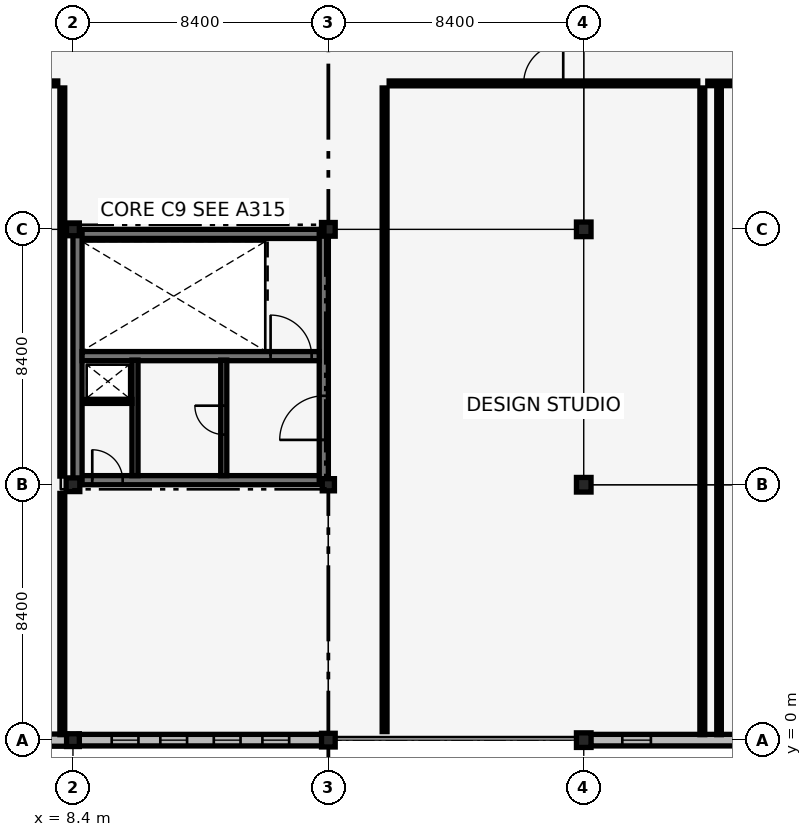
"""IFC4 building model, lengths in metres.
Left out: names, types, materials, properties, quantities, classifications, styles, units other than length and angle.
Written with IfcOpenShell. Run it as: python <this file> out.ifc"""

import sys

from ifc_helpers import new_model, si_unit, direction, frame, frame_2d, origin, origin_2d, place, context, subcontext, project, spatial, rectangle, extrude, element, fill, save


model = new_model("IFC4")
c1 = context("Model", 3, precision=1e-05, world=origin(), true_north=direction((0.0, 1.0)))
c2 = subcontext(c1, "Body", "Model", "MODEL_VIEW")
j1 = project(units=[si_unit("LENGTHUNIT", "METRE"), si_unit("PLANEANGLEUNIT", "RADIAN")], contexts=[c1])
p1 = place(None, origin())
s1 = spatial("IfcSite", under=j1, at=p1, CompositionType="ELEMENT")
p2 = place(p1, origin())
s2 = spatial("IfcBuilding", under=s1, at=p2, CompositionType="ELEMENT")
p3 = place(p2, frame((0.0, 0.0, 5.44)))
s3 = spatial("IfcBuildingStorey", under=s2, at=p3, CompositionType="ELEMENT", Elevation=5.44)
p4 = place(p3, frame((8.55, 8.55, 0.0), z_axis=(0.0, 0.0, 1.0), x_axis=(1.0, 0.0, 0.0)))
e1 = element("IfcWall", 1, at=p4, inside=s3, PredefinedType="SHEAR", context=c2, shape_type="SweptSolid", body=[
    extrude(rectangle(XDim=8.1, YDim=0.3, at=frame_2d((4.05, 0.0))), origin(), (0.0, 0.0, 1.0), 4.12),
])
p5 = place(p4, frame((0.485, 0.0, 0.0)))
e2 = element("IfcOpeningElement", 2, at=p5, cuts=e1, PredefinedType="OPENING", context=c2, shape_type="SweptSolid", body=[
    extrude(rectangle(XDim=1.0, YDim=2.15, at=frame_2d((0.5, 1.075))), frame((0.0, 0.16, 0.0), z_axis=(0.0, -1.0, 0.0), x_axis=(1.0, 0.0, 0.0)), (0.0, 0.0, 1.0), 0.32),
])
for number, where, z_axis, x_axis in (
    (3, (8.55, 16.65, 0.0), (0.0, 0.0, 1.0), (1.0, 0.0, 0.0)),
    (4, (8.55, 8.55, 0.0), (0.0, 0.0, 1.0), (0.0, 1.0, 0.0)),
):
    element("IfcWall", number, at=place(p3, frame(where, z_axis=z_axis, x_axis=x_axis)), inside=s3, PredefinedType="SHEAR", context=c2, shape_type="SweptSolid", body=[
        extrude(rectangle(XDim=8.1, YDim=0.3, at=frame_2d((4.05, 0.0))), origin(), (0.0, 0.0, 1.0), 4.12),
    ])
p6 = place(p3, frame((16.65, 8.55, 0.0), z_axis=(0.0, 0.0, 1.0), x_axis=(0.0, 1.0, 0.0)))
e5 = element("IfcWall", 5, at=p6, inside=s3, PredefinedType="SHEAR", context=c2, shape_type="SweptSolid", body=[
    extrude(rectangle(XDim=8.1, YDim=0.3, at=frame_2d((4.05, 0.0))), origin(), (0.0, 0.0, 1.0), 4.12),
])
p7 = place(p6, frame((1.325, 0.0, 0.0)))
e6 = element("IfcOpeningElement", 6, at=p7, cuts=e5, PredefinedType="OPENING", context=c2, shape_type="SweptSolid", body=[
    extrude(rectangle(XDim=1.45, YDim=2.15, at=frame_2d((0.725, 1.075))), frame((0.0, 0.16, 0.0), z_axis=(0.0, -1.0, 0.0), x_axis=(1.0, 0.0, 0.0)), (0.0, 0.0, 1.0), 0.32),
])
p8 = place(p3, frame((8.7, 12.63, 0.0), z_axis=(0.0, 0.0, 1.0), x_axis=(1.0, 0.0, 0.0)))
e7 = element("IfcWall", 7, at=p8, inside=s3, PredefinedType="SHEAR", context=c2, shape_type="SweptSolid", body=[
    extrude(rectangle(XDim=7.8, YDim=0.3, at=frame_2d((3.9, 0.0))), origin(), (0.0, 0.0, 1.0), 4.12),
])
p9 = place(p8, frame((6.2, 0.0, 0.0)))
e8 = element("IfcOpeningElement", 8, at=p9, cuts=e7, PredefinedType="OPENING", context=c2, shape_type="SweptSolid", body=[
    extrude(rectangle(XDim=1.35, YDim=2.15, at=frame_2d((0.675, 1.075))), frame((0.0, 0.16, 0.0), z_axis=(0.0, -1.0, 0.0), x_axis=(1.0, 0.0, 0.0)), (0.0, 0.0, 1.0), 0.32),
])
p10 = place(p3, frame((8.4, 0.0, 0.0), z_axis=(0.0, 0.0, 1.0), x_axis=(1.0, 0.0, 0.0)))
e9 = element("IfcColumn", 9, at=p10, inside=s3, PredefinedType="COLUMN", context=c2, shape_type="SweptSolid", body=[
    extrude(rectangle(XDim=0.42, YDim=0.42, at=origin_2d()), origin(), (0.0, 0.0, 1.0), 4.12),
])
p11 = place(p3, frame((8.4, 8.4, 0.0), z_axis=(0.0, 0.0, 1.0), x_axis=(1.0, 0.0, 0.0)))
e10 = element("IfcColumn", 10, at=p11, inside=s3, PredefinedType="COLUMN", context=c2, shape_type="SweptSolid", body=[
    extrude(rectangle(XDim=0.45, YDim=0.45, at=origin_2d()), origin(), (0.0, 0.0, 1.0), 4.12),
])
p12 = place(p3, frame((8.4, 16.8, 0.0), z_axis=(0.0, 0.0, 1.0), x_axis=(1.0, 0.0, 0.0)))
e11 = element("IfcColumn", 11, at=p12, inside=s3, PredefinedType="COLUMN", context=c2, shape_type="SweptSolid", body=[
    extrude(rectangle(XDim=0.42, YDim=0.42, at=origin_2d()), origin(), (0.0, 0.0, 1.0), 4.12),
])
p13 = place(p3, frame((16.8, 0.0, 0.0), z_axis=(0.0, 0.0, 1.0), x_axis=(1.0, 0.0, 0.0)))
e12 = element("IfcColumn", 12, at=p13, inside=s3, PredefinedType="COLUMN", context=c2, shape_type="SweptSolid", body=[
    extrude(rectangle(XDim=0.45, YDim=0.45, at=origin_2d()), origin(), (0.0, 0.0, 1.0), 4.12),
])
p14 = place(p3, frame((16.8, 8.4, 0.0), z_axis=(0.0, 0.0, 1.0), x_axis=(1.0, 0.0, 0.0)))
e13 = element("IfcColumn", 13, at=p14, inside=s3, PredefinedType="COLUMN", context=c2, shape_type="SweptSolid", body=[
    extrude(rectangle(XDim=0.4, YDim=0.4, at=origin_2d()), origin(), (0.0, 0.0, 1.0), 4.12),
])
p15 = place(p3, frame((16.8, 16.8, 0.0), z_axis=(0.0, 0.0, 1.0), x_axis=(1.0, 0.0, 0.0)))
e14 = element("IfcColumn", 14, at=p15, inside=s3, PredefinedType="COLUMN", context=c2, shape_type="SweptSolid", body=[
    extrude(rectangle(XDim=0.45, YDim=0.45, at=origin_2d()), origin(), (0.0, 0.0, 1.0), 4.12),
])
for number, where, z_axis, x_axis in (
    (15, (25.2, 0.0, 0.0), (0.0, 0.0, 1.0), (1.0, 0.0, 0.0)),
    (16, (25.2, 8.4, 0.0), (0.0, 0.0, 1.0), (1.0, 0.0, 0.0)),
    (17, (25.2, 16.8, 0.0), (0.0, 0.0, 1.0), (1.0, 0.0, 0.0)),
):
    element("IfcColumn", number, at=place(p3, frame(where, z_axis=z_axis, x_axis=x_axis)), inside=s3, PredefinedType="COLUMN", context=c2, shape_type="SweptSolid", body=[
        extrude(rectangle(XDim=0.48, YDim=0.48, at=origin_2d()), origin(), (0.0, 0.0, 1.0), 4.12),
    ])
p16 = place(p3, frame((0.225, 0.0, 0.0), z_axis=(0.0, 0.0, 1.0), x_axis=(1.0, 0.0, 0.0)))
e18 = element("IfcWall", 18, at=p16, inside=s3, PredefinedType="SOLIDWALL", context=c2, shape_type="SweptSolid", body=[
    extrude(rectangle(XDim=7.98, YDim=0.4, at=frame_2d((3.99, 0.0))), origin(), (0.0, 0.0, 1.0), 4.12),
])
p17 = place(p16, frame((1.086, 0.0, 0.75)))
e19 = element("IfcOpeningElement", 19, at=p17, cuts=e18, PredefinedType="OPENING", context=c2, shape_type="SweptSolid", body=[
    extrude(rectangle(XDim=0.86, YDim=2.9, at=frame_2d((0.43, 1.45))), frame((0.0, 0.21, 0.0), z_axis=(0.0, -1.0, 0.0), x_axis=(1.0, 0.0, 0.0)), (0.0, 0.0, 1.0), 0.42),
])
p18 = place(p16, frame((2.682, 0.0, 0.75)))
e20 = element("IfcOpeningElement", 20, at=p18, cuts=e18, PredefinedType="OPENING", context=c2, shape_type="SweptSolid", body=[
    extrude(rectangle(XDim=0.86, YDim=2.9, at=frame_2d((0.43, 1.45))), frame((0.0, 0.21, 0.0), z_axis=(0.0, -1.0, 0.0), x_axis=(1.0, 0.0, 0.0)), (0.0, 0.0, 1.0), 0.42),
])
p19 = place(p16, frame((4.438, 0.0, 0.75)))
e21 = element("IfcOpeningElement", 21, at=p19, cuts=e18, PredefinedType="OPENING", context=c2, shape_type="SweptSolid", body=[
    extrude(rectangle(XDim=0.86, YDim=2.9, at=frame_2d((0.43, 1.45))), frame((0.0, 0.21, 0.0), z_axis=(0.0, -1.0, 0.0), x_axis=(1.0, 0.0, 0.0)), (0.0, 0.0, 1.0), 0.42),
])
p20 = place(p16, frame((6.034, 0.0, 0.75)))
e22 = element("IfcOpeningElement", 22, at=p20, cuts=e18, PredefinedType="OPENING", context=c2, shape_type="SweptSolid", body=[
    extrude(rectangle(XDim=0.86, YDim=2.9, at=frame_2d((0.43, 1.45))), frame((0.0, 0.21, 0.0), z_axis=(0.0, -1.0, 0.0), x_axis=(1.0, 0.0, 0.0)), (0.0, 0.0, 1.0), 0.42),
])
p21 = place(p3, frame((8.595, 0.0, 0.0), z_axis=(0.0, 0.0, 1.0), x_axis=(1.0, 0.0, 0.0)))
e23 = element("IfcWall", 23, at=p21, inside=s3, PredefinedType="SOLIDWALL", context=c2, shape_type="SweptSolid", body=[
    extrude(rectangle(XDim=7.995, YDim=0.38, at=frame_2d((3.998, 0.0))), origin(), (0.0, 0.0, 1.0), 4.12),
])
p22 = place(p21, frame((1.079, 0.0, 0.75)))
e24 = element("IfcOpeningElement", 24, at=p22, cuts=e23, PredefinedType="OPENING", context=c2, shape_type="SweptSolid", body=[
    extrude(rectangle(XDim=0.88, YDim=2.45, at=frame_2d((0.44, 1.225))), frame((0.0, 0.2, 0.0), z_axis=(0.0, -1.0, 0.0), x_axis=(1.0, 0.0, 0.0)), (0.0, 0.0, 1.0), 0.4),
])
p23 = place(p21, frame((2.678, 0.0, 0.75)))
e25 = element("IfcOpeningElement", 25, at=p23, cuts=e23, PredefinedType="OPENING", context=c2, shape_type="SweptSolid", body=[
    extrude(rectangle(XDim=0.88, YDim=2.45, at=frame_2d((0.44, 1.225))), frame((0.0, 0.2, 0.0), z_axis=(0.0, -1.0, 0.0), x_axis=(1.0, 0.0, 0.0)), (0.0, 0.0, 1.0), 0.4),
])
p24 = place(p21, frame((4.437, 0.0, 0.75)))
e26 = element("IfcOpeningElement", 26, at=p24, cuts=e23, PredefinedType="OPENING", context=c2, shape_type="SweptSolid", body=[
    extrude(rectangle(XDim=0.88, YDim=2.45, at=frame_2d((0.44, 1.225))), frame((0.0, 0.2, 0.0), z_axis=(0.0, -1.0, 0.0), x_axis=(1.0, 0.0, 0.0)), (0.0, 0.0, 1.0), 0.4),
])
p25 = place(p21, frame((6.036, 0.0, 0.75)))
e27 = element("IfcOpeningElement", 27, at=p25, cuts=e23, PredefinedType="OPENING", context=c2, shape_type="SweptSolid", body=[
    extrude(rectangle(XDim=0.88, YDim=2.45, at=frame_2d((0.44, 1.225))), frame((0.0, 0.2, 0.0), z_axis=(0.0, -1.0, 0.0), x_axis=(1.0, 0.0, 0.0)), (0.0, 0.0, 1.0), 0.4),
])
p26 = place(p3, frame((25.425, 0.0, 0.0), z_axis=(0.0, 0.0, 1.0), x_axis=(1.0, 0.0, 0.0)))
e28 = element("IfcWall", 28, at=p26, inside=s3, PredefinedType="SOLIDWALL", context=c2, shape_type="SweptSolid", body=[
    extrude(rectangle(XDim=7.965, YDim=0.38, at=frame_2d((3.982, 0.0))), origin(), (0.0, 0.0, 1.0), 4.12),
])
p27 = place(p26, frame((1.043, 0.0, 0.75)))
e29 = element("IfcOpeningElement", 29, at=p27, cuts=e28, PredefinedType="OPENING", context=c2, shape_type="SweptSolid", body=[
    extrude(rectangle(XDim=0.94, YDim=2.55, at=frame_2d((0.47, 1.275))), frame((0.0, 0.2, 0.0), z_axis=(0.0, -1.0, 0.0), x_axis=(1.0, 0.0, 0.0)), (0.0, 0.0, 1.0), 0.4),
])
p28 = place(p26, frame((5.982, 0.0, 0.75)))
e30 = element("IfcOpeningElement", 30, at=p28, cuts=e28, PredefinedType="OPENING", context=c2, shape_type="SweptSolid", body=[
    extrude(rectangle(XDim=0.94, YDim=2.55, at=frame_2d((0.47, 1.275))), frame((0.0, 0.2, 0.0), z_axis=(0.0, -1.0, 0.0), x_axis=(1.0, 0.0, 0.0)), (0.0, 0.0, 1.0), 0.4),
])
p29 = place(p3, frame((13.36, 8.7, 0.0), z_axis=(0.0, 0.0, 1.0), x_axis=(0.0, 1.0, 0.0)))
e31 = element("IfcWall", 31, at=p29, inside=s3, PredefinedType="SHEAR", context=c2, shape_type="SweptSolid", body=[
    extrude(rectangle(XDim=3.8, YDim=0.2, at=frame_2d((1.9, 0.0))), origin(), (0.0, 0.0, 1.0), 4.12),
])
p30 = place(p29, frame((1.35, 0.0, 0.0)))
e32 = element("IfcOpeningElement", 32, at=p30, cuts=e31, PredefinedType="OPENING", context=c2, shape_type="SweptSolid", body=[
    extrude(rectangle(XDim=0.95, YDim=2.1, at=frame_2d((0.475, 1.05))), frame((0.0, 0.11, 0.0), z_axis=(0.0, -1.0, 0.0), x_axis=(1.0, 0.0, 0.0)), (0.0, 0.0, 1.0), 0.22),
])
p31 = place(p3, frame((10.44, 8.7, 0.0), z_axis=(0.0, 0.0, 1.0), x_axis=(0.0, 1.0, 0.0)))
e33 = element("IfcWall", 33, at=p31, inside=s3, PredefinedType="SHEAR", context=c2, shape_type="SweptSolid", body=[
    extrude(rectangle(XDim=3.8, YDim=0.2, at=frame_2d((1.9, 0.0))), origin(), (0.0, 0.0, 1.0), 4.12),
])
p32 = place(p3, frame((8.72, 11.14, 0.0), z_axis=(0.0, 0.0, 1.0), x_axis=(1.0, 0.0, 0.0)))
e34 = element("IfcWall", 34, at=p32, inside=s3, PredefinedType="PARTITIONING", context=c2, shape_type="SweptSolid", body=[
    extrude(rectangle(XDim=1.62, YDim=0.13, at=frame_2d((0.81, 0.0))), origin(), (0.0, 0.0, 1.0), 4.12),
])
p33 = place(p3, frame((0.18, 21.6, 0.0), z_axis=(0.0, 0.0, 1.0), x_axis=(1.0, 0.0, 0.0)))
e35 = element("IfcWall", 35, at=p33, inside=s3, PredefinedType="PARTITIONING", context=c2, shape_type="SweptSolid", body=[
    extrude(rectangle(XDim=7.72, YDim=0.16, at=frame_2d((3.86, 0.0))), origin(), (0.0, 0.0, 1.0), 4.12),
])
p34 = place(p33, frame((3.21, 0.0, 0.0)))
e36 = element("IfcOpeningElement", 36, at=p34, cuts=e35, PredefinedType="OPENING", context=c2, shape_type="SweptSolid", body=[
    extrude(rectangle(XDim=1.3, YDim=2.2, at=frame_2d((0.65, 1.1))), frame((0.0, 0.09, 0.0), z_axis=(0.0, -1.0, 0.0), x_axis=(1.0, 0.0, 0.0)), (0.0, 0.0, 1.0), 0.18),
])
p35 = place(p3, frame((8.05, 0.18, 0.0), z_axis=(0.0, 0.0, 1.0), x_axis=(0.0, 1.0, 0.0)))
e37 = element("IfcWall", 37, at=p35, inside=s3, PredefinedType="PARTITIONING", context=c2, shape_type="SweptSolid", body=[
    extrude(rectangle(XDim=7.935, YDim=0.16, at=frame_2d((3.968, 0.0))), origin(), (0.0, 0.0, 1.0), 4.12),
])
p36 = place(p3, frame((8.05, 8.685, 0.0), z_axis=(0.0, 0.0, 1.0), x_axis=(0.0, 1.0, 0.0)))
e38 = element("IfcWall", 38, at=p36, inside=s3, PredefinedType="PARTITIONING", context=c2, shape_type="SweptSolid", body=[
    extrude(rectangle(XDim=12.765, YDim=0.16, at=frame_2d((6.382, 0.0))), origin(), (0.0, 0.0, 1.0), 4.12),
])
p37 = place(p3, frame((18.8, 21.6, 0.0), z_axis=(0.0, 0.0, 1.0), x_axis=(1.0, 0.0, 0.0)))
e39 = element("IfcWall", 39, at=p37, inside=s3, PredefinedType="PARTITIONING", context=c2, shape_type="SweptSolid", body=[
    extrude(rectangle(XDim=10.15, YDim=0.16, at=frame_2d((5.075, 0.0))), origin(), (0.0, 0.0, 1.0), 4.12),
])
p38 = place(p37, frame((4.425, 0.0, 0.0)))
e40 = element("IfcOpeningElement", 40, at=p38, cuts=e39, PredefinedType="OPENING", context=c2, shape_type="SweptSolid", body=[
    extrude(rectangle(XDim=1.3, YDim=2.2, at=frame_2d((0.65, 1.1))), frame((0.0, 0.09, 0.0), z_axis=(0.0, -1.0, 0.0), x_axis=(1.0, 0.0, 0.0)), (0.0, 0.0, 1.0), 0.18),
])
p39 = place(p3, frame((18.65, 0.28, 0.0), z_axis=(0.0, 0.0, 1.0), x_axis=(0.0, 1.0, 0.0)))
e41 = element("IfcWall", 41, at=p39, inside=s3, PredefinedType="PARTITIONING", context=c2, shape_type="SweptSolid", body=[
    extrude(rectangle(XDim=21.17, YDim=0.16, at=frame_2d((10.585, 0.0))), origin(), (0.0, 0.0, 1.0), 4.12),
])
p40 = place(p3, frame((29.1, 0.18, 0.0), z_axis=(0.0, 0.0, 1.0), x_axis=(0.0, 1.0, 0.0)))
e42 = element("IfcWall", 42, at=p40, inside=s3, PredefinedType="PARTITIONING", context=c2, shape_type="SweptSolid", body=[
    extrude(rectangle(XDim=21.27, YDim=0.16, at=frame_2d((10.635, 0.0))), origin(), (0.0, 0.0, 1.0), 4.12),
])
p41 = place(p3, frame((29.28, 21.6, 0.0), z_axis=(0.0, 0.0, 1.0), x_axis=(1.0, 0.0, 0.0)))
e43 = element("IfcWall", 43, at=p41, inside=s3, PredefinedType="PARTITIONING", context=c2, shape_type="SweptSolid", body=[
    extrude(rectangle(XDim=20.52, YDim=0.15, at=frame_2d((10.26, 0.0))), origin(), (0.0, 0.0, 1.0), 4.12),
])
p42 = place(p41, frame((9.735, 0.0, 0.0)))
e44 = element("IfcOpeningElement", 44, at=p42, cuts=e43, PredefinedType="OPENING", context=c2, shape_type="SweptSolid", body=[
    extrude(rectangle(XDim=1.05, YDim=2.15, at=frame_2d((0.525, 1.075))), frame((0.0, 0.085, 0.0), z_axis=(0.0, -1.0, 0.0), x_axis=(1.0, 0.0, 0.0)), (0.0, 0.0, 1.0), 0.17),
])
p43 = place(p3, frame((29.65, 0.18, 0.0), z_axis=(0.0, 0.0, 1.0), x_axis=(0.0, 1.0, 0.0)))
e45 = element("IfcWall", 45, at=p43, inside=s3, PredefinedType="PARTITIONING", context=c2, shape_type="SweptSolid", body=[
    extrude(rectangle(XDim=21.27, YDim=0.15, at=frame_2d((10.635, 0.0))), origin(), (0.0, 0.0, 1.0), 4.12),
])
p44 = place(p22, origin())
e46 = element("IfcWindow", 46, at=p44, inside=s3, PartitioningType="DOUBLE_PANEL_VERTICAL", PredefinedType="WINDOW", context=c2, shape_type="SweptSolid", body=[
    extrude(rectangle(XDim=0.88, YDim=2.45, at=frame_2d((0.44, 1.225))), frame((0.0, 0.03, 0.0), z_axis=(0.0, -1.0, 0.0), x_axis=(1.0, 0.0, 0.0)), (0.0, 0.0, 1.0), 0.06),
])
fill(e24, e46)
p45 = place(p23, origin())
e47 = element("IfcWindow", 47, at=p45, inside=s3, PartitioningType="DOUBLE_PANEL_VERTICAL", PredefinedType="WINDOW", context=c2, shape_type="SweptSolid", body=[
    extrude(rectangle(XDim=0.88, YDim=2.45, at=frame_2d((0.44, 1.225))), frame((0.0, 0.03, 0.0), z_axis=(0.0, -1.0, 0.0), x_axis=(1.0, 0.0, 0.0)), (0.0, 0.0, 1.0), 0.06),
])
fill(e25, e47)
p46 = place(p24, origin())
e48 = element("IfcWindow", 48, at=p46, inside=s3, PartitioningType="DOUBLE_PANEL_VERTICAL", PredefinedType="WINDOW", context=c2, shape_type="SweptSolid", body=[
    extrude(rectangle(XDim=0.88, YDim=2.45, at=frame_2d((0.44, 1.225))), frame((0.0, 0.03, 0.0), z_axis=(0.0, -1.0, 0.0), x_axis=(1.0, 0.0, 0.0)), (0.0, 0.0, 1.0), 0.06),
])
fill(e26, e48)
p47 = place(p25, origin())
e49 = element("IfcWindow", 49, at=p47, inside=s3, PartitioningType="DOUBLE_PANEL_VERTICAL", PredefinedType="WINDOW", context=c2, shape_type="SweptSolid", body=[
    extrude(rectangle(XDim=0.88, YDim=2.45, at=frame_2d((0.44, 1.225))), frame((0.0, 0.03, 0.0), z_axis=(0.0, -1.0, 0.0), x_axis=(1.0, 0.0, 0.0)), (0.0, 0.0, 1.0), 0.06),
])
fill(e27, e49)
p48 = place(p27, origin())
e50 = element("IfcWindow", 50, at=p48, inside=s3, PartitioningType="DOUBLE_PANEL_VERTICAL", PredefinedType="WINDOW", context=c2, shape_type="SweptSolid", body=[
    extrude(rectangle(XDim=0.94, YDim=2.55, at=frame_2d((0.47, 1.275))), frame((0.0, 0.03, 0.0), z_axis=(0.0, -1.0, 0.0), x_axis=(1.0, 0.0, 0.0)), (0.0, 0.0, 1.0), 0.06),
])
fill(e29, e50)
p49 = place(p9, origin())
e51 = element("IfcDoor", 51, at=p49, inside=s3, OperationType="SINGLE_SWING_LEFT", PredefinedType="DOOR", context=c2, shape_type="SweptSolid", body=[
    extrude(rectangle(XDim=1.35, YDim=2.15, at=frame_2d((0.675, 1.075))), frame((0.0, 0.025, 0.0), z_axis=(0.0, -1.0, 0.0), x_axis=(1.0, 0.0, 0.0)), (0.0, 0.0, 1.0), 0.05),
])
fill(e8, e51)
p50 = place(p30, origin())
e52 = element("IfcDoor", 52, at=p50, inside=s3, OperationType="SINGLE_SWING_RIGHT", PredefinedType="DOOR", context=c2, shape_type="SweptSolid", body=[
    extrude(rectangle(XDim=0.95, YDim=2.1, at=frame_2d((0.475, 1.05))), frame((0.0, 0.025, 0.0), z_axis=(0.0, -1.0, 0.0), x_axis=(1.0, 0.0, 0.0)), (0.0, 0.0, 1.0), 0.05),
])
fill(e32, e52)
p51 = place(p7, origin())
e53 = element("IfcDoor", 53, at=p51, inside=s3, OperationType="DOUBLE_DOOR_SINGLE_SWING", PredefinedType="DOOR", context=c2, shape_type="SweptSolid", body=[
    extrude(rectangle(XDim=1.45, YDim=2.15, at=frame_2d((0.725, 1.075))), frame((0.0, 0.025, 0.0), z_axis=(0.0, -1.0, 0.0), x_axis=(1.0, 0.0, 0.0)), (0.0, 0.0, 1.0), 0.05),
])
fill(e6, e53)
p52 = place(p5, origin())
e54 = element("IfcDoor", 54, at=p52, inside=s3, OperationType="SINGLE_SWING_LEFT", PredefinedType="DOOR", context=c2, shape_type="SweptSolid", body=[
    extrude(rectangle(XDim=1.0, YDim=2.15, at=frame_2d((0.5, 1.075))), frame((0.0, 0.025, 0.0), z_axis=(0.0, -1.0, 0.0), x_axis=(1.0, 0.0, 0.0)), (0.0, 0.0, 1.0), 0.05),
])
fill(e2, e54)
p53 = place(p38, origin())
e55 = element("IfcDoor", 55, at=p53, inside=s3, OperationType="SINGLE_SWING_RIGHT", PredefinedType="DOOR", context=c2, shape_type="SweptSolid", body=[
    extrude(rectangle(XDim=1.3, YDim=2.2, at=frame_2d((0.65, 1.1))), frame((0.0, 0.025, 0.0), z_axis=(0.0, -1.0, 0.0), x_axis=(1.0, 0.0, 0.0)), (0.0, 0.0, 1.0), 0.05),
])
fill(e40, e55)
save(model, sys.argv[1])
